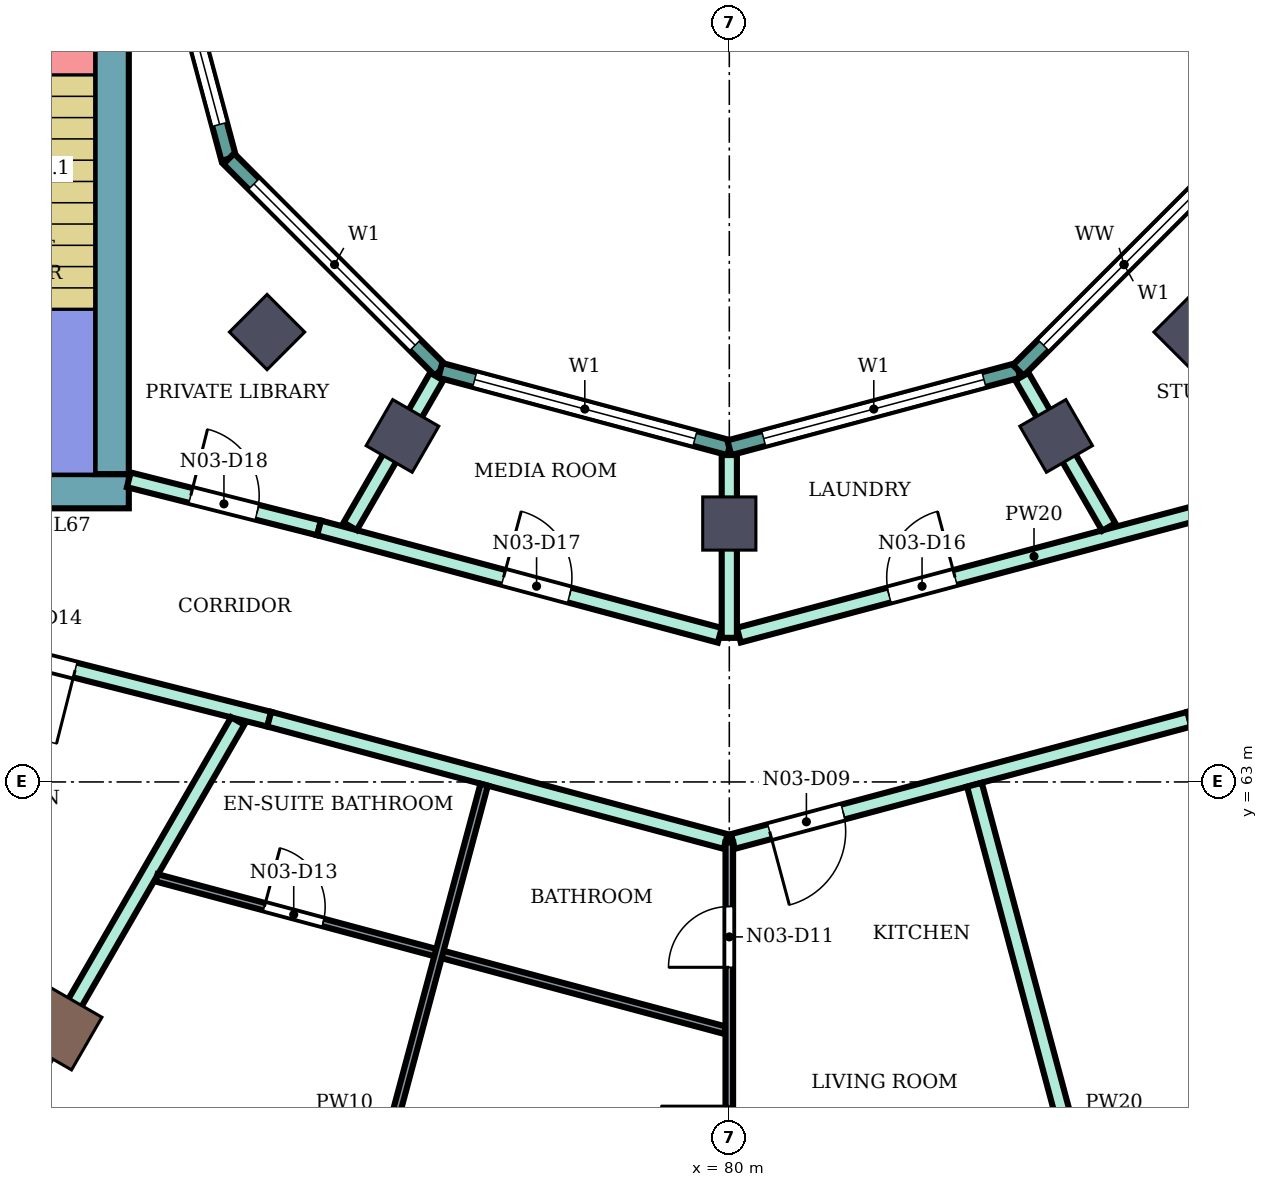
"""IFC4 building model, lengths in metres.
Left out: names, types, materials, properties, quantities, classifications, styles, units other than length and angle.
Written with IfcOpenShell. Run it as: python <this file> out.ifc"""

import sys

from ifc_helpers import new_model, si_unit, direction, frame, frame_2d, origin, origin_2d, place, context, subcontext, project, spatial, rectangle, extrude, element, fill, save


model = new_model("IFC4")
c1 = context("Model", 3, precision=1e-05, world=origin(), true_north=direction((0.0, 1.0)))
c2 = subcontext(c1, "Body", "Model", "MODEL_VIEW")
j1 = project(units=[si_unit("LENGTHUNIT", "METRE"), si_unit("PLANEANGLEUNIT", "RADIAN")], contexts=[c1])
p1 = place(None, origin())
s1 = spatial("IfcSite", under=j1, at=p1, CompositionType="ELEMENT")
p2 = place(p1, origin())
s2 = spatial("IfcBuilding", under=s1, at=p2, CompositionType="ELEMENT")
p3 = place(p2, frame((0.0, 0.0, 292.5)))
s3 = spatial("IfcBuildingStorey", under=s2, at=p3, CompositionType="ELEMENT", Elevation=292.5)
p4 = place(p3, frame((71.2, 59.758, 0.0), z_axis=(0.0, 0.0, 1.0), x_axis=(-0.5, -0.866025403784, 0.0)))
e1 = element("IfcColumn", 1, at=p4, inside=s3, PredefinedType="COLUMN", context=c2, shape_type="SweptSolid", body=[
    extrude(rectangle(XDim=0.8, YDim=0.8, at=origin_2d()), origin(), (0.0, 0.0, 1.0), 4.2),
])
for number, where, z_axis, x_axis in (
    (2, (73.919, 68.919, 0.0), (0.0, 0.0, 1.0), (-0.707, -0.707, 0.0)),
    (3, (75.7, 67.552, 0.0), (0.0, 0.0, 1.0), (-0.5, -0.866, 0.0)),
    (4, (80.0, 66.4, 0.0), (0.0, 0.0, 1.0), (0.0, -1.0, 0.0)),
    (5, (84.3, 67.552, 0.0), (0.0, 0.0, 1.0), (0.5, -0.866, 0.0)),
    (6, (86.081, 68.919, 0.0), (0.0, 0.0, 1.0), (0.707, -0.707, 0.0)),
):
    element("IfcColumn", number, at=place(p3, frame(where, z_axis=z_axis, x_axis=x_axis)), inside=s3, PredefinedType="COLUMN", context=c2, shape_type="SweptSolid", body=[
        extrude(rectangle(XDim=0.7, YDim=0.7, at=origin_2d()), origin(), (0.0, 0.0, 1.0), 4.2),
    ])
p5 = place(p3, frame((72.1, 66.825, 0.0), z_axis=(0.0, 0.0, 1.0), x_axis=(-1.0, 0.0, 0.0)))
e7 = element("IfcWall", 7, at=p5, inside=s3, PredefinedType="SHEAR", context=c2, shape_type="SweptSolid", body=[
    extrude(rectangle(XDim=12.0, YDim=0.45, at=frame_2d((6.0, 0.0))), origin(), (0.0, 0.0, 1.0), 3.88),
])
p6 = place(p5, frame((4.2, 0.0, 0.0)))
e8 = element("IfcOpeningElement", 8, at=p6, cuts=e7, PredefinedType="OPENING", context=c2, shape_type="SweptSolid", body=[
    extrude(rectangle(XDim=2.4, YDim=2.4, at=frame_2d((1.2, 1.2))), frame((0.0, 0.235, 0.0), z_axis=(0.0, -1.0, 0.0), x_axis=(1.0, 0.0, 0.0)), (0.0, 0.0, 1.0), 0.47),
])
p7 = place(p3, frame((71.875, 75.0, 0.0), z_axis=(0.0, 0.0, 1.0), x_axis=(0.0, -1.0, 0.0)))
e9 = element("IfcWall", 9, at=p7, inside=s3, PredefinedType="SHEAR", context=c2, shape_type="SweptSolid", body=[
    extrude(rectangle(XDim=7.95, YDim=0.45, at=frame_2d((3.975, 0.0))), origin(), (0.0, 0.0, 1.0), 3.88),
])
p8 = place(p3, frame((72.396, 75.0, 0.0), z_axis=(0.0, 0.0, 1.0), x_axis=(0.258789828301, -0.965933654434, 0.0)))
e10 = element("IfcWall", 10, at=p8, inside=s3, PredefinedType="NOTDEFINED", context=c2, shape_type="SweptSolid", body=[
    extrude(rectangle(XDim=3.936, YDim=0.2, at=frame_2d((1.968, 0.0))), origin(), (0.0, 0.0, 1.0), 4.2),
])
p9 = place(p8, frame((0.468, 0.0, 0.9)))
e11 = element("IfcOpeningElement", 11, at=p9, cuts=e10, PredefinedType="OPENING", context=c2, shape_type="SweptSolid", body=[
    extrude(rectangle(XDim=3.0, YDim=2.3, at=frame_2d((1.5, 1.15))), frame((0.0, 0.11, 0.0), z_axis=(0.0, -1.0, 0.0), x_axis=(1.0, 0.0, 0.0)), (0.0, 0.0, 1.0), 0.22),
])
p10 = place(p3, frame((73.415, 71.198, 0.0), z_axis=(0.0, 0.0, 1.0), x_axis=(0.707106781187, -0.707106781187, 0.0)))
e12 = element("IfcWall", 12, at=p10, inside=s3, PredefinedType="NOTDEFINED", context=c2, shape_type="SweptSolid", body=[
    extrude(rectangle(XDim=3.936, YDim=0.2, at=frame_2d((1.968, 0.0))), origin(), (0.0, 0.0, 1.0), 4.2),
])
p11 = place(p10, frame((0.468, 0.0, 0.9)))
e13 = element("IfcOpeningElement", 13, at=p11, cuts=e12, PredefinedType="OPENING", context=c2, shape_type="SweptSolid", body=[
    extrude(rectangle(XDim=3.0, YDim=2.3, at=frame_2d((1.5, 1.15))), frame((0.0, 0.11, 0.0), z_axis=(0.0, -1.0, 0.0), x_axis=(1.0, 0.0, 0.0)), (0.0, 0.0, 1.0), 0.22),
])
p12 = place(p3, frame((76.198, 68.415, 0.0), z_axis=(0.0, 0.0, 1.0), x_axis=(0.965933654434, -0.258789828301, 0.0)))
e14 = element("IfcWall", 14, at=p12, inside=s3, PredefinedType="NOTDEFINED", context=c2, shape_type="SweptSolid", body=[
    extrude(rectangle(XDim=3.936, YDim=0.2, at=frame_2d((1.968, 0.0))), origin(), (0.0, 0.0, 1.0), 4.2),
])
p13 = place(p12, frame((0.468, 0.0, 0.9)))
e15 = element("IfcOpeningElement", 15, at=p13, cuts=e14, PredefinedType="OPENING", context=c2, shape_type="SweptSolid", body=[
    extrude(rectangle(XDim=3.0, YDim=2.3, at=frame_2d((1.5, 1.15))), frame((0.0, 0.11, 0.0), z_axis=(0.0, -1.0, 0.0), x_axis=(1.0, 0.0, 0.0)), (0.0, 0.0, 1.0), 0.22),
])
p14 = place(p3, frame((80.0, 67.396, 0.0), z_axis=(0.0, 0.0, 1.0), x_axis=(0.965933654434, 0.258789828301, 0.0)))
e16 = element("IfcWall", 16, at=p14, inside=s3, PredefinedType="NOTDEFINED", context=c2, shape_type="SweptSolid", body=[
    extrude(rectangle(XDim=3.936, YDim=0.2, at=frame_2d((1.968, 0.0))), origin(), (0.0, 0.0, 1.0), 4.2),
])
p15 = place(p14, frame((0.468, 0.0, 0.9)))
e17 = element("IfcOpeningElement", 17, at=p15, cuts=e16, PredefinedType="OPENING", context=c2, shape_type="SweptSolid", body=[
    extrude(rectangle(XDim=3.0, YDim=2.3, at=frame_2d((1.5, 1.15))), frame((0.0, 0.11, 0.0), z_axis=(0.0, -1.0, 0.0), x_axis=(1.0, 0.0, 0.0)), (0.0, 0.0, 1.0), 0.22),
])
p16 = place(p3, frame((83.802, 68.415, 0.0), z_axis=(0.0, 0.0, 1.0), x_axis=(0.707106781187, 0.707106781187, 0.0)))
e18 = element("IfcWall", 18, at=p16, inside=s3, PredefinedType="NOTDEFINED", context=c2, shape_type="SweptSolid", body=[
    extrude(rectangle(XDim=3.936, YDim=0.2, at=frame_2d((1.968, 0.0))), origin(), (0.0, 0.0, 1.0), 4.2),
])
p17 = place(p16, frame((0.468, 0.0, 0.9)))
e19 = element("IfcOpeningElement", 19, at=p17, cuts=e18, PredefinedType="OPENING", context=c2, shape_type="SweptSolid", body=[
    extrude(rectangle(XDim=3.0, YDim=2.3, at=frame_2d((1.5, 1.15))), frame((0.0, 0.11, 0.0), z_axis=(0.0, -1.0, 0.0), x_axis=(1.0, 0.0, 0.0)), (0.0, 0.0, 1.0), 0.22),
])
p18 = place(p3, frame((68.201, 65.28, 0.0), z_axis=(0.0, 0.0, 1.0), x_axis=(0.969421088032, -0.245403247897, 0.0)))
e20 = element("IfcWall", 20, at=p18, inside=s3, PredefinedType="PARTITIONING", context=c2, shape_type="SweptSolid", body=[
    extrude(rectangle(XDim=5.927, YDim=0.2, at=frame_2d((2.964, 0.0))), origin(), (0.0, 0.0, 1.0), 3.75),
])
p19 = place(p18, frame((2.293, 0.0, 0.0)))
e21 = element("IfcOpeningElement", 21, at=p19, cuts=e20, PredefinedType="OPENING", context=c2, shape_type="SweptSolid", body=[
    extrude(rectangle(XDim=1.0, YDim=2.1, at=frame_2d((0.5, 1.05))), frame((0.0, 0.11, 0.0), z_axis=(0.0, -1.0, 0.0), x_axis=(1.0, 0.0, 0.0)), (0.0, 0.0, 1.0), 0.22),
])
p20 = place(p3, frame((68.849, 55.692, 0.0), z_axis=(0.0, 0.0, 1.0), x_axis=(0.50011732958, 0.865957652922, 0.0)))
e22 = element("IfcWall", 22, at=p20, inside=s3, PredefinedType="PARTITIONING", context=c2, shape_type="SweptSolid", body=[
    extrude(rectangle(XDim=9.365, YDim=0.2, at=frame_2d((4.683, 0.0))), origin(), (0.0, 0.0, 1.0), 3.75),
])
p21 = place(p3, frame((72.1, 66.975, 0.0), z_axis=(0.0, 0.0, 1.0), x_axis=(0.969471314457, -0.245204752086, 0.0)))
e23 = element("IfcWall", 23, at=p21, inside=s3, PredefinedType="PARTITIONING", context=c2, shape_type="SweptSolid", body=[
    extrude(rectangle(XDim=2.582, YDim=0.2, at=frame_2d((1.291, 0.0))), origin(), (0.0, 0.0, 1.0), 3.75),
])
p22 = place(p21, frame((0.841, 0.0, 0.0)))
e24 = element("IfcOpeningElement", 24, at=p22, cuts=e23, PredefinedType="OPENING", context=c2, shape_type="SweptSolid", body=[
    extrude(rectangle(XDim=0.9, YDim=2.1, at=frame_2d((0.45, 1.05))), frame((0.0, 0.11, 0.0), z_axis=(0.0, -1.0, 0.0), x_axis=(1.0, 0.0, 0.0)), (0.0, 0.0, 1.0), 0.22),
])
p23 = place(p3, frame((73.947, 63.826, 0.0), z_axis=(0.0, 0.0, 1.0), x_axis=(0.965908253407, -0.258884619088, 0.0)))
e25 = element("IfcWall", 25, at=p23, inside=s3, PredefinedType="PARTITIONING", context=c2, shape_type="SweptSolid", body=[
    extrude(rectangle(XDim=6.217, YDim=0.2, at=frame_2d((3.108, 0.0))), origin(), (0.0, 0.0, 1.0), 3.75),
])
p24 = place(p3, frame((74.603, 66.342, 0.0), z_axis=(0.0, 0.0, 1.0), x_axis=(0.965920893652, -0.258837453254, 0.0)))
e26 = element("IfcWall", 26, at=p24, inside=s3, PredefinedType="PARTITIONING", context=c2, shape_type="SweptSolid", body=[
    extrude(rectangle(XDim=5.458, YDim=0.2, at=frame_2d((2.729, 0.0))), origin(), (0.0, 0.0, 1.0), 3.75),
])
p25 = place(p24, frame((2.512, 0.0, 0.0)))
e27 = element("IfcOpeningElement", 27, at=p25, cuts=e26, PredefinedType="OPENING", context=c2, shape_type="SweptSolid", body=[
    extrude(rectangle(XDim=0.9, YDim=2.1, at=frame_2d((0.45, 1.05))), frame((0.0, 0.11, 0.0), z_axis=(0.0, -1.0, 0.0), x_axis=(1.0, 0.0, 0.0)), (0.0, 0.0, 1.0), 0.22),
])
p26 = place(p3, frame((75.012, 66.363, 0.0), z_axis=(0.0, 0.0, 1.0), x_axis=(0.500097042406, 0.865969369075, 0.0)))
e28 = element("IfcWall", 28, at=p26, inside=s3, PredefinedType="PARTITIONING", context=c2, shape_type="SweptSolid", body=[
    extrude(rectangle(XDim=2.275, YDim=0.2, at=frame_2d((1.138, 0.0))), origin(), (0.0, 0.0, 1.0), 3.75),
])
p27 = place(p3, frame((80.125, 64.932, 0.0), z_axis=(0.0, 0.0, 1.0), x_axis=(0.966236955806, 0.257655089674, 0.0)))
e29 = element("IfcWall", 29, at=p27, inside=s3, PredefinedType="PARTITIONING", context=c2, shape_type="SweptSolid", body=[
    extrude(rectangle(XDim=8.039, YDim=0.2, at=frame_2d((4.02, 0.0))), origin(), (0.0, 0.0, 1.0), 3.75),
])
p28 = place(p27, frame((6.298, 0.0, 0.0)))
e30 = element("IfcOpeningElement", 30, at=p28, cuts=e29, PredefinedType="OPENING", context=c2, shape_type="SweptSolid", body=[
    extrude(rectangle(XDim=0.9, YDim=2.1, at=frame_2d((0.45, 1.05))), frame((0.0, 0.11, 0.0), z_axis=(0.0, -1.0, 0.0), x_axis=(1.0, 0.0, 0.0)), (0.0, 0.0, 1.0), 0.22),
])
p29 = place(p27, frame((2.045, 0.0, 0.0)))
e31 = element("IfcOpeningElement", 31, at=p29, cuts=e29, PredefinedType="OPENING", context=c2, shape_type="SweptSolid", body=[
    extrude(rectangle(XDim=0.9, YDim=2.1, at=frame_2d((0.45, 1.05))), frame((0.0, 0.11, 0.0), z_axis=(0.0, -1.0, 0.0), x_axis=(1.0, 0.0, 0.0)), (0.0, 0.0, 1.0), 0.22),
])
p30 = place(p3, frame((80.048, 62.217, 0.0), z_axis=(0.0, 0.0, 1.0), x_axis=(0.965937709386, 0.258774692708, 0.0)))
e32 = element("IfcWall", 32, at=p30, inside=s3, PredefinedType="PARTITIONING", context=c2, shape_type="SweptSolid", body=[
    extrude(rectangle(XDim=6.216, YDim=0.2, at=frame_2d((3.108, 0.0))), origin(), (0.0, 0.0, 1.0), 3.75),
])
p31 = place(p30, frame((0.5, 0.0, 0.0)))
e33 = element("IfcOpeningElement", 33, at=p31, cuts=e32, PredefinedType="OPENING", context=c2, shape_type="SweptSolid", body=[
    extrude(rectangle(XDim=1.0, YDim=2.1, at=frame_2d((0.5, 1.05))), frame((0.0, 0.11, 0.0), z_axis=(0.0, -1.0, 0.0), x_axis=(1.0, 0.0, 0.0)), (0.0, 0.0, 1.0), 0.22),
])
p32 = place(p3, frame((80.0, 64.896, 0.0), z_axis=(0.0, 0.0, 1.0), x_axis=(0.0, 1.0, 0.0)))
e34 = element("IfcWall", 34, at=p32, inside=s3, PredefinedType="PARTITIONING", context=c2, shape_type="SweptSolid", body=[
    extrude(rectangle(XDim=2.405, YDim=0.2, at=frame_2d((1.203, 0.0))), origin(), (0.0, 0.0, 1.0), 3.75),
])
p33 = place(p3, frame((83.225, 62.963, 0.0), z_axis=(0.0, 0.0, 1.0), x_axis=(0.258782398991, -0.96593564484, 0.0)))
e35 = element("IfcWall", 35, at=p33, inside=s3, PredefinedType="PARTITIONING", context=c2, shape_type="SweptSolid", body=[
    extrude(rectangle(XDim=9.837, YDim=0.2, at=frame_2d((4.918, 0.0))), origin(), (0.0, 0.0, 1.0), 3.75),
])
p34 = place(p3, frame((83.85, 68.333, 0.0), z_axis=(0.0, 0.0, 1.0), x_axis=(0.500080019051, -0.865979199835, 0.0)))
e36 = element("IfcWall", 36, at=p34, inside=s3, PredefinedType="PARTITIONING", context=c2, shape_type="SweptSolid", body=[
    extrude(rectangle(XDim=2.285, YDim=0.2, at=frame_2d((1.143, 0.0))), origin(), (0.0, 0.0, 1.0), 3.75),
])
p35 = place(p3, frame((86.053, 63.826, 0.0), z_axis=(0.0, 0.0, 1.0), x_axis=(0.969480070232, 0.245170131586, 0.0)))
e37 = element("IfcWall", 37, at=p35, inside=s3, PredefinedType="PARTITIONING", context=c2, shape_type="SweptSolid", body=[
    extrude(rectangle(XDim=5.907, YDim=0.2, at=frame_2d((2.954, 0.0))), origin(), (0.0, 0.0, 1.0), 3.75),
])
p36 = place(p35, frame((2.464, 0.0, 0.0)))
e38 = element("IfcOpeningElement", 38, at=p36, cuts=e37, PredefinedType="OPENING", context=c2, shape_type="SweptSolid", body=[
    extrude(rectangle(XDim=1.0, YDim=2.1, at=frame_2d((0.5, 1.05))), frame((0.0, 0.11, 0.0), z_axis=(0.0, -1.0, 0.0), x_axis=(1.0, 0.0, 0.0)), (0.0, 0.0, 1.0), 0.22),
])
p37 = place(p3, frame((72.465, 61.739, 0.0), z_axis=(0.0, 0.0, 1.0), x_axis=(0.965899611634, -0.258916859715, 0.0)))
e39 = element("IfcWall", 39, at=p37, inside=s3, PredefinedType="PARTITIONING", context=c2, shape_type="SweptSolid", body=[
    extrude(rectangle(XDim=7.74, YDim=0.1, at=frame_2d((3.87, 0.0))), origin(), (0.0, 0.0, 1.0), 3.75),
])
p38 = place(p37, frame((1.468, 0.0, 0.0)))
e40 = element("IfcOpeningElement", 40, at=p38, cuts=e39, PredefinedType="OPENING", context=c2, shape_type="SweptSolid", body=[
    extrude(rectangle(XDim=0.8, YDim=2.1, at=frame_2d((0.4, 1.05))), frame((0.0, 0.06, 0.0), z_axis=(0.0, -1.0, 0.0), x_axis=(1.0, 0.0, 0.0)), (0.0, 0.0, 1.0), 0.12),
])
p39 = place(p3, frame((74.229, 53.462, 0.0), z_axis=(0.0, 0.0, 1.0), x_axis=(0.258810097991, 0.965928223616, 0.0)))
e41 = element("IfcWall", 41, at=p39, inside=s3, PredefinedType="PARTITIONING", context=c2, shape_type="SweptSolid", body=[
    extrude(rectangle(XDim=9.838, YDim=0.1, at=frame_2d((4.919, 0.0))), origin(), (0.0, 0.0, 1.0), 3.75),
])
p40 = place(p39, frame((3.344, 0.0, 0.0)))
e42 = element("IfcOpeningElement", 42, at=p40, cuts=e41, PredefinedType="OPENING", context=c2, shape_type="SweptSolid", body=[
    extrude(rectangle(XDim=0.9, YDim=2.1, at=frame_2d((0.45, 1.05))), frame((0.0, 0.06, 0.0), z_axis=(0.0, -1.0, 0.0), x_axis=(1.0, 0.0, 0.0)), (0.0, 0.0, 1.0), 0.12),
])
p41 = place(p3, frame((80.0, 55.3, 0.0), z_axis=(0.0, 0.0, 1.0), x_axis=(0.0, 1.0, 0.0)))
e43 = element("IfcWall", 43, at=p41, inside=s3, PredefinedType="PARTITIONING", context=c2, shape_type="SweptSolid", body=[
    extrude(rectangle(XDim=6.904, YDim=0.1, at=frame_2d((3.452, 0.0))), origin(), (0.0, 0.0, 1.0), 3.75),
])
p42 = place(p41, frame((2.534, 0.0, 0.0)))
e44 = element("IfcOpeningElement", 44, at=p42, cuts=e43, PredefinedType="OPENING", context=c2, shape_type="SweptSolid", body=[
    extrude(rectangle(XDim=0.9, YDim=2.1, at=frame_2d((0.45, 1.05))), frame((0.0, 0.06, 0.0), z_axis=(0.0, -1.0, 0.0), x_axis=(1.0, 0.0, 0.0)), (0.0, 0.0, 1.0), 0.12),
])
p43 = place(p41, frame((5.261, 0.0, 0.0)))
e45 = element("IfcOpeningElement", 45, at=p43, cuts=e43, PredefinedType="OPENING", context=c2, shape_type="SweptSolid", body=[
    extrude(rectangle(XDim=0.8, YDim=2.1, at=frame_2d((0.4, 1.05))), frame((0.0, 0.06, 0.0), z_axis=(0.0, -1.0, 0.0), x_axis=(1.0, 0.0, 0.0)), (0.0, 0.0, 1.0), 0.12),
])
p44 = place(p9, origin())
e46 = element("IfcWindow", 46, at=p44, inside=s3, PartitioningType="SINGLE_PANEL", PredefinedType="WINDOW", context=c2, shape_type="SweptSolid", body=[
    extrude(rectangle(XDim=3.0, YDim=2.3, at=frame_2d((1.5, 1.15))), frame((0.0, 0.03, 0.0), z_axis=(0.0, -1.0, 0.0), x_axis=(1.0, 0.0, 0.0)), (0.0, 0.0, 1.0), 0.06),
])
fill(e11, e46)
p45 = place(p11, origin())
e47 = element("IfcWindow", 47, at=p45, inside=s3, PartitioningType="SINGLE_PANEL", PredefinedType="WINDOW", context=c2, shape_type="SweptSolid", body=[
    extrude(rectangle(XDim=3.0, YDim=2.3, at=frame_2d((1.5, 1.15))), frame((0.0, 0.03, 0.0), z_axis=(0.0, -1.0, 0.0), x_axis=(1.0, 0.0, 0.0)), (0.0, 0.0, 1.0), 0.06),
])
fill(e13, e47)
p46 = place(p13, origin())
e48 = element("IfcWindow", 48, at=p46, inside=s3, PartitioningType="SINGLE_PANEL", PredefinedType="WINDOW", context=c2, shape_type="SweptSolid", body=[
    extrude(rectangle(XDim=3.0, YDim=2.3, at=frame_2d((1.5, 1.15))), frame((0.0, 0.03, 0.0), z_axis=(0.0, -1.0, 0.0), x_axis=(1.0, 0.0, 0.0)), (0.0, 0.0, 1.0), 0.06),
])
fill(e15, e48)
p47 = place(p15, origin())
e49 = element("IfcWindow", 49, at=p47, inside=s3, PartitioningType="SINGLE_PANEL", PredefinedType="WINDOW", context=c2, shape_type="SweptSolid", body=[
    extrude(rectangle(XDim=3.0, YDim=2.3, at=frame_2d((1.5, 1.15))), frame((0.0, 0.03, 0.0), z_axis=(0.0, -1.0, 0.0), x_axis=(1.0, 0.0, 0.0)), (0.0, 0.0, 1.0), 0.06),
])
fill(e17, e49)
p48 = place(p17, origin())
e50 = element("IfcWindow", 50, at=p48, inside=s3, PartitioningType="SINGLE_PANEL", PredefinedType="WINDOW", context=c2, shape_type="SweptSolid", body=[
    extrude(rectangle(XDim=3.0, YDim=2.3, at=frame_2d((1.5, 1.15))), frame((0.0, 0.03, 0.0), z_axis=(0.0, -1.0, 0.0), x_axis=(1.0, 0.0, 0.0)), (0.0, 0.0, 1.0), 0.06),
])
fill(e19, e50)
p49 = place(p31, frame((1.0, 0.0, 0.0), z_axis=(0.0, 0.0, 1.0), x_axis=(-1.0, 0.0, 0.0)))
e51 = element("IfcDoor", 51, at=p49, inside=s3, OperationType="SINGLE_SWING_RIGHT", PredefinedType="DOOR", context=c2, shape_type="SweptSolid", body=[
    extrude(rectangle(XDim=1.0, YDim=2.1, at=frame_2d((0.5, 1.05))), frame((0.0, 0.025, 0.0), z_axis=(0.0, -1.0, 0.0), x_axis=(1.0, 0.0, 0.0)), (0.0, 0.0, 1.0), 0.05),
])
fill(e33, e51)
p50 = place(p42, origin())
e52 = element("IfcDoor", 52, at=p50, inside=s3, OperationType="SINGLE_SWING_RIGHT", PredefinedType="DOOR", context=c2, shape_type="SweptSolid", body=[
    extrude(rectangle(XDim=0.9, YDim=2.1, at=frame_2d((0.45, 1.05))), frame((0.0, 0.025, 0.0), z_axis=(0.0, -1.0, 0.0), x_axis=(1.0, 0.0, 0.0)), (0.0, 0.0, 1.0), 0.05),
])
fill(e44, e52)
p51 = place(p43, origin())
e53 = element("IfcDoor", 53, at=p51, inside=s3, OperationType="SINGLE_SWING_LEFT", PredefinedType="DOOR", context=c2, shape_type="SweptSolid", body=[
    extrude(rectangle(XDim=0.8, YDim=2.1, at=frame_2d((0.4, 1.05))), frame((0.0, 0.025, 0.0), z_axis=(0.0, -1.0, 0.0), x_axis=(1.0, 0.0, 0.0)), (0.0, 0.0, 1.0), 0.05),
])
fill(e45, e53)
p52 = place(p38, origin())
e54 = element("IfcDoor", 54, at=p52, inside=s3, OperationType="SINGLE_SWING_LEFT", PredefinedType="DOOR", context=c2, shape_type="SweptSolid", body=[
    extrude(rectangle(XDim=0.8, YDim=2.1, at=frame_2d((0.4, 1.05))), frame((0.0, 0.025, 0.0), z_axis=(0.0, -1.0, 0.0), x_axis=(1.0, 0.0, 0.0)), (0.0, 0.0, 1.0), 0.05),
])
fill(e40, e54)
p53 = place(p19, frame((1.0, 0.0, 0.0), z_axis=(0.0, 0.0, 1.0), x_axis=(-1.0, 0.0, 0.0)))
e55 = element("IfcDoor", 55, at=p53, inside=s3, OperationType="SINGLE_SWING_LEFT", PredefinedType="DOOR", context=c2, shape_type="SweptSolid", body=[
    extrude(rectangle(XDim=1.0, YDim=2.1, at=frame_2d((0.5, 1.05))), frame((0.0, 0.025, 0.0), z_axis=(0.0, -1.0, 0.0), x_axis=(1.0, 0.0, 0.0)), (0.0, 0.0, 1.0), 0.05),
])
fill(e21, e55)
p54 = place(p29, origin())
e56 = element("IfcDoor", 56, at=p54, inside=s3, OperationType="SINGLE_SWING_RIGHT", PredefinedType="DOOR", context=c2, shape_type="SweptSolid", body=[
    extrude(rectangle(XDim=0.9, YDim=2.1, at=frame_2d((0.45, 1.05))), frame((0.0, 0.025, 0.0), z_axis=(0.0, -1.0, 0.0), x_axis=(1.0, 0.0, 0.0)), (0.0, 0.0, 1.0), 0.05),
])
fill(e31, e56)
p55 = place(p25, origin())
e57 = element("IfcDoor", 57, at=p55, inside=s3, OperationType="SINGLE_SWING_LEFT", PredefinedType="DOOR", context=c2, shape_type="SweptSolid", body=[
    extrude(rectangle(XDim=0.9, YDim=2.1, at=frame_2d((0.45, 1.05))), frame((0.0, 0.025, 0.0), z_axis=(0.0, -1.0, 0.0), x_axis=(1.0, 0.0, 0.0)), (0.0, 0.0, 1.0), 0.05),
])
fill(e27, e57)
p56 = place(p22, origin())
e58 = element("IfcDoor", 58, at=p56, inside=s3, OperationType="SINGLE_SWING_LEFT", PredefinedType="DOOR", context=c2, shape_type="SweptSolid", body=[
    extrude(rectangle(XDim=0.9, YDim=2.1, at=frame_2d((0.45, 1.05))), frame((0.0, 0.025, 0.0), z_axis=(0.0, -1.0, 0.0), x_axis=(1.0, 0.0, 0.0)), (0.0, 0.0, 1.0), 0.05),
])
fill(e24, e58)
save(model, sys.argv[1])
